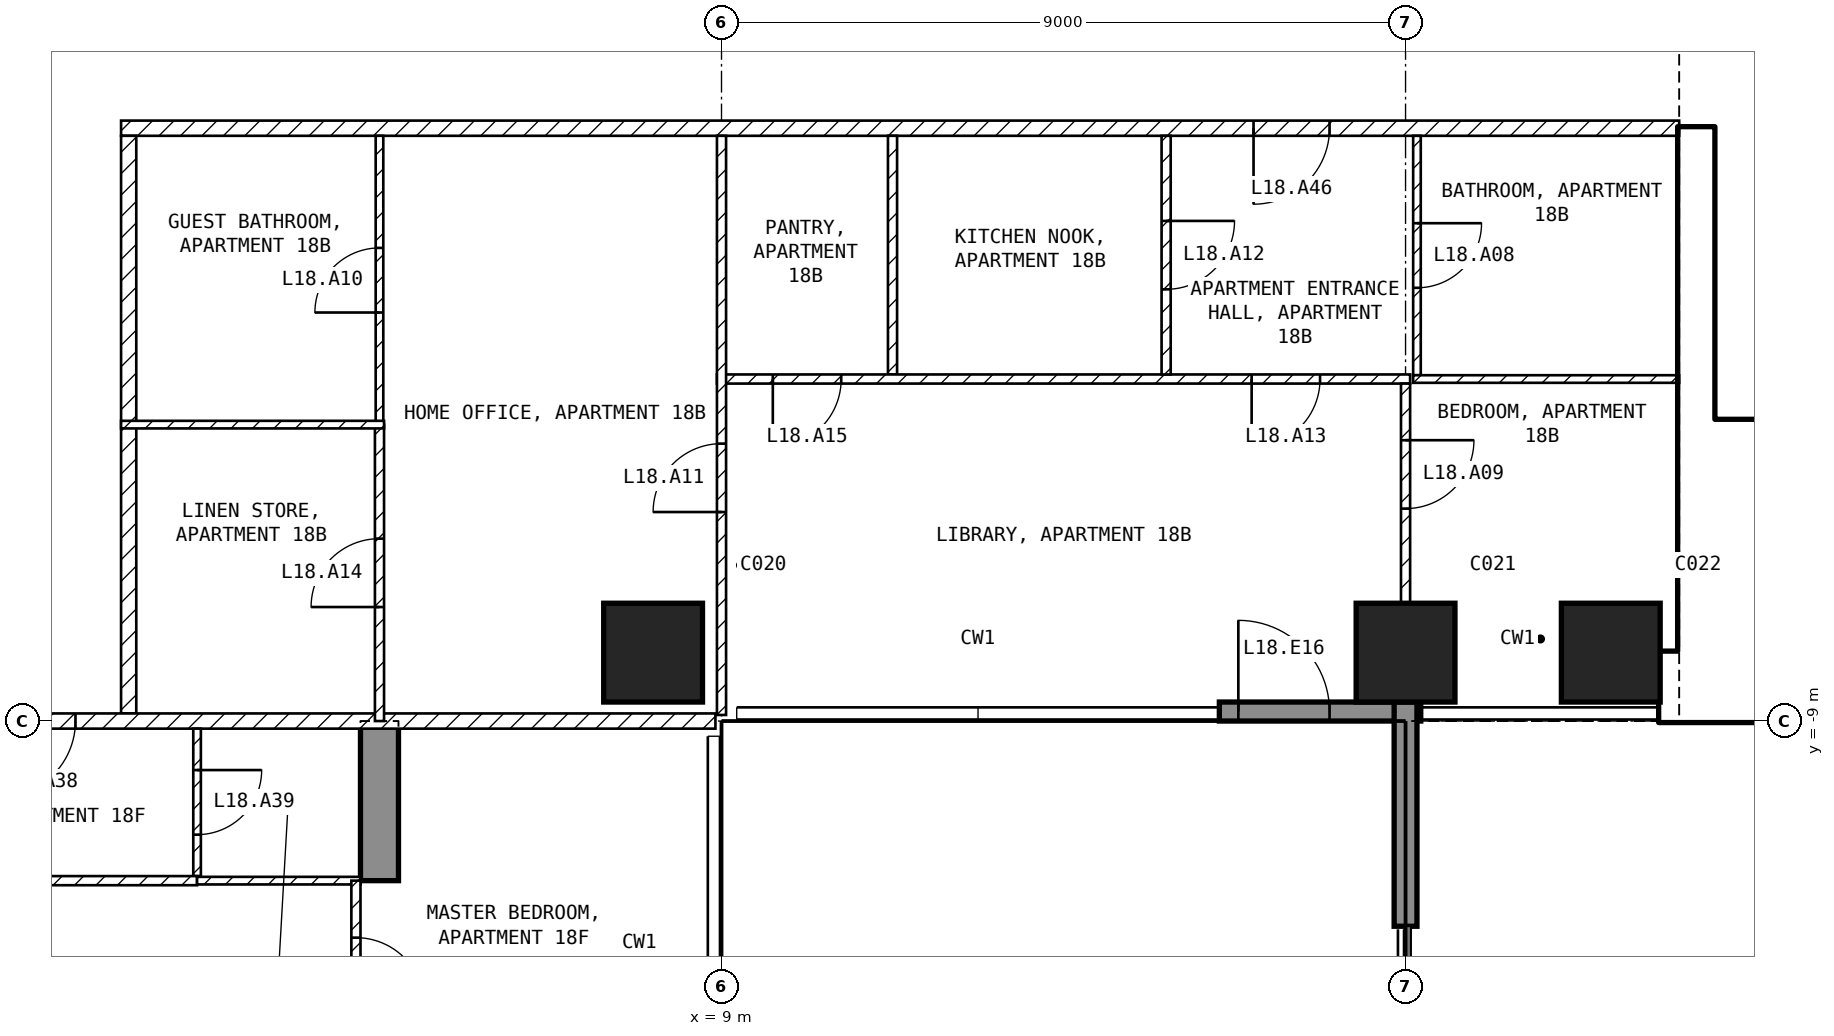
"""IFC4 building model, lengths in metres.
Left out: names, types, materials, properties, quantities, classifications, styles, units other than length and angle.
Written with IfcOpenShell. Run it as: python <this file> out.ifc"""

import sys

from ifc_helpers import new_model, si_unit, direction, frame, frame_2d, origin, origin_2d, place, context, subcontext, project, spatial, polyline, rectangle, outline, extrude, element, fill, save


model = new_model("IFC4")
c1 = context("Model", 3, precision=1e-05, world=origin(), true_north=direction((0.0, 1.0)))
c2 = subcontext(c1, "Body", "Model", "MODEL_VIEW")
j1 = project(units=[si_unit("LENGTHUNIT", "METRE"), si_unit("PLANEANGLEUNIT", "RADIAN")], contexts=[c1])
p1 = place(None, origin())
s1 = spatial("IfcSite", under=j1, at=p1, CompositionType="ELEMENT")
p2 = place(p1, origin())
s2 = spatial("IfcBuilding", under=s1, at=p2, CompositionType="ELEMENT")
p3 = place(p2, frame((0.0, 0.0, 82.0)))
s3 = spatial("IfcBuildingStorey", under=s2, at=p3, CompositionType="ELEMENT", Elevation=82.0)
for number, where, z_axis, x_axis in (
    (1, (8.1, -8.1, -0.25), (0.0, 0.0, 1.0), (1.0, 0.0, 0.0)),
    (2, (18.0, -8.1, -0.25), (0.0, 0.0, 1.0), (1.0, 0.0, 0.0)),
    (3, (20.7, -8.1, -0.25), (0.0, 0.0, 1.0), (1.0, 0.0, 0.0)),
):
    element("IfcColumn", number, at=place(p3, frame(where, z_axis=z_axis, x_axis=x_axis)), inside=s3, PredefinedType="COLUMN", context=c2, shape_type="SweptSolid", body=[
        extrude(rectangle(XDim=1.3, YDim=1.3, at=origin_2d()), origin(), (0.0, 0.0, 1.0), 3.5),
    ])
p4 = place(p3, frame((4.25, -25.45, -0.25), z_axis=(1.0, 0.0, 0.0), x_axis=(0.0, 1.0, 0.0)))
e4 = element("IfcWall", 4, at=p4, inside=s3, PredefinedType="SHEAR", context=c2, shape_type="SweptSolid", body=[
    extrude(outline(polyline([(0.0, 0.0), (4.15, 0.0), (4.15, 2.65), (6.55, 2.65), (6.55, 0.0), (11.95, 0.0), (11.95, 2.65), (14.35, 2.65), (14.35, 0.0), (16.45, 0.0), (16.45, 3.5), (0.0, 3.5), (0.0, 0.0)])), origin(), (0.0, 0.0, 1.0), 0.5),
])
p5 = place(p3, frame((15.55, -8.875, 0.0), z_axis=(0.0, 0.0, 1.0), x_axis=(1.0, 0.0, 0.0)))
e5 = element("IfcWall", 5, at=p5, inside=s3, PredefinedType="SOLIDWALL", context=c2, shape_type="SweptSolid", body=[
    extrude(rectangle(XDim=2.65, YDim=0.25, at=frame_2d((1.325, 0.0))), origin(), (0.0, 0.0, 1.0), 3.25),
])
p6 = place(p5, frame((0.25, 0.0, 0.0)))
e6 = element("IfcOpeningElement", 6, at=p6, cuts=e5, PredefinedType="OPENING", context=c2, shape_type="SweptSolid", body=[
    extrude(rectangle(XDim=1.2, YDim=2.4, at=frame_2d((0.6, 1.2))), frame((0.0, 0.135, 0.0), z_axis=(0.0, -1.0, 0.0), x_axis=(1.0, 0.0, 0.0)), (0.0, 0.0, 1.0), 0.27),
])
p7 = place(p3, frame((18.0, -8.75, 0.0), z_axis=(0.0, 0.0, 1.0), x_axis=(0.0, -1.0, 0.0)))
e7 = element("IfcWall", 7, at=p7, inside=s3, PredefinedType="SOLIDWALL", context=c2, shape_type="SweptSolid", body=[
    extrude(rectangle(XDim=2.95, YDim=0.3, at=frame_2d((1.475, 0.0))), origin(), (0.0, 0.0, 1.0), 3.25),
])
p8 = place(p3, frame((21.35, -8.55, 0.0), z_axis=(0.0, 0.0, 1.0), x_axis=(1.0, 0.0, 0.0)))
e8 = element("IfcWall", 8, at=p8, inside=s3, PredefinedType="SHEAR", context=c2, shape_type="SweptSolid", body=[
    extrude(rectangle(XDim=11.05, YDim=0.9, at=frame_2d((5.525, 0.0))), origin(), (0.0, 0.0, 1.0), 3.25),
])
p9 = place(p3, frame((21.825, -8.1, 0.0), z_axis=(0.0, 0.0, 1.0), x_axis=(0.0, 1.0, 0.0)))
e9 = element("IfcWall", 9, at=p9, inside=s3, PredefinedType="SHEAR", context=c2, shape_type="SweptSolid", body=[
    extrude(rectangle(XDim=6.9, YDim=0.45, at=frame_2d((3.45, 0.0))), origin(), (0.0, 0.0, 1.0), 3.25),
])
p10 = place(p3, frame((22.05, -5.15, 0.0), z_axis=(0.0, 0.0, 1.0), x_axis=(1.0, 0.0, 0.0)))
e10 = element("IfcWall", 10, at=p10, inside=s3, PredefinedType="SOLIDWALL", context=c2, shape_type="SweptSolid", body=[
    extrude(rectangle(XDim=6.3, YDim=0.2, at=frame_2d((3.15, 0.0))), origin(), (0.0, 0.0, 1.0), 3.25),
])
p11 = place(p10, frame((0.2, 0.0, 0.0)))
e11 = element("IfcOpeningElement", 11, at=p11, cuts=e10, PredefinedType="OPENING", context=c2, shape_type="SweptSolid", body=[
    extrude(rectangle(XDim=1.0, YDim=2.1, at=frame_2d((0.5, 1.05))), frame((0.0, 0.11, 0.0), z_axis=(0.0, -1.0, 0.0), x_axis=(1.0, 0.0, 0.0)), (0.0, 0.0, 1.0), 0.22),
])
p12 = place(p3, frame((21.6, -1.2, 0.0), z_axis=(0.0, 0.0, 1.0), x_axis=(-1.0, 0.0, 0.0)))
e12 = element("IfcWall", 12, at=p12, inside=s3, PredefinedType="PARTITIONING", context=c2, shape_type="SweptSolid", body=[
    extrude(rectangle(XDim=20.5, YDim=0.2, at=frame_2d((10.25, 0.0))), origin(), (0.0, 0.0, 1.0), 3.25),
])
p13 = place(p12, frame((4.6, 0.0, 0.0)))
e13 = element("IfcOpeningElement", 13, at=p13, cuts=e12, PredefinedType="OPENING", context=c2, shape_type="SweptSolid", body=[
    extrude(rectangle(XDim=1.0, YDim=2.1, at=frame_2d((0.5, 1.05))), frame((0.0, 0.11, 0.0), z_axis=(0.0, -1.0, 0.0), x_axis=(1.0, 0.0, 0.0)), (0.0, 0.0, 1.0), 0.22),
])
p14 = place(p3, frame((1.2, -1.3, 0.0), z_axis=(0.0, 0.0, 1.0), x_axis=(0.0, -1.0, 0.0)))
e14 = element("IfcWall", 14, at=p14, inside=s3, PredefinedType="PARTITIONING", context=c2, shape_type="SweptSolid", body=[
    extrude(rectangle(XDim=7.6, YDim=0.2, at=frame_2d((3.8, 0.0))), origin(), (0.0, 0.0, 1.0), 3.25),
])
p15 = place(p3, frame((8.92, -9.0, 0.0), z_axis=(0.0, 0.0, 1.0), x_axis=(-1.0, 0.0, 0.0)))
e15 = element("IfcWall", 15, at=p15, inside=s3, PredefinedType="PARTITIONING", context=c2, shape_type="SweptSolid", body=[
    extrude(rectangle(XDim=17.84, YDim=0.2, at=frame_2d((8.92, 0.0))), origin(), (0.0, 0.0, 1.0), 3.25),
])
p16 = place(p15, frame((8.42, 0.0, 0.0)))
e16 = element("IfcOpeningElement", 16, at=p16, cuts=e15, PredefinedType="OPENING", context=c2, shape_type="SweptSolid", body=[
    extrude(rectangle(XDim=1.0, YDim=2.1, at=frame_2d((0.5, 1.05))), frame((0.0, 0.11, 0.0), z_axis=(0.0, -1.0, 0.0), x_axis=(1.0, 0.0, 0.0)), (0.0, 0.0, 1.0), 0.22),
])
p17 = place(p3, frame((11.25, -1.3, 0.0), z_axis=(0.0, 0.0, 1.0), x_axis=(0.0, -1.0, 0.0)))
e17 = element("IfcWall", 17, at=p17, inside=s3, PredefinedType="PARTITIONING", context=c2, shape_type="SweptSolid", body=[
    extrude(rectangle(XDim=3.14, YDim=0.12, at=frame_2d((1.57, 0.0))), origin(), (0.0, 0.0, 1.0), 3.25),
])
p18 = place(p3, frame((18.06, -4.5, 0.0), z_axis=(0.0, 0.0, 1.0), x_axis=(-1.0, 0.0, 0.0)))
e18 = element("IfcWall", 18, at=p18, inside=s3, PredefinedType="PARTITIONING", context=c2, shape_type="SweptSolid", body=[
    extrude(rectangle(XDim=9.12, YDim=0.12, at=frame_2d((4.56, 0.0))), origin(), (0.0, 0.0, 1.0), 3.25),
])
p19 = place(p18, frame((1.185, 0.0, 0.0)))
e19 = element("IfcOpeningElement", 19, at=p19, cuts=e18, PredefinedType="OPENING", context=c2, shape_type="SweptSolid", body=[
    extrude(rectangle(XDim=0.9, YDim=2.1, at=frame_2d((0.45, 1.05))), frame((0.0, 0.07, 0.0), z_axis=(0.0, -1.0, 0.0), x_axis=(1.0, 0.0, 0.0)), (0.0, 0.0, 1.0), 0.14),
])
p20 = place(p18, frame((7.485, 0.0, 0.0)))
e20 = element("IfcOpeningElement", 20, at=p20, cuts=e18, PredefinedType="OPENING", context=c2, shape_type="SweptSolid", body=[
    extrude(rectangle(XDim=0.9, YDim=2.1, at=frame_2d((0.45, 1.05))), frame((0.0, 0.07, 0.0), z_axis=(0.0, -1.0, 0.0), x_axis=(1.0, 0.0, 0.0)), (0.0, 0.0, 1.0), 0.14),
])
p21 = place(p3, frame((9.0, -8.92, 0.0), z_axis=(0.0, 0.0, 1.0), x_axis=(0.0, 1.0, 0.0)))
e21 = element("IfcWall", 21, at=p21, inside=s3, PredefinedType="PARTITIONING", context=c2, shape_type="SweptSolid", body=[
    extrude(rectangle(XDim=7.62, YDim=0.12, at=frame_2d((3.81, 0.0))), origin(), (0.0, 0.0, 1.0), 3.25),
])
p22 = place(p21, frame((2.67, 0.0, 0.0)))
e22 = element("IfcOpeningElement", 22, at=p22, cuts=e21, PredefinedType="OPENING", context=c2, shape_type="SweptSolid", body=[
    extrude(rectangle(XDim=0.9, YDim=2.1, at=frame_2d((0.45, 1.05))), frame((0.0, 0.07, 0.0), z_axis=(0.0, -1.0, 0.0), x_axis=(1.0, 0.0, 0.0)), (0.0, 0.0, 1.0), 0.14),
])
p23 = place(p3, frame((14.85, -1.3, 0.0), z_axis=(0.0, 0.0, 1.0), x_axis=(0.0, -1.0, 0.0)))
e23 = element("IfcWall", 23, at=p23, inside=s3, PredefinedType="PARTITIONING", context=c2, shape_type="SweptSolid", body=[
    extrude(rectangle(XDim=3.14, YDim=0.12, at=frame_2d((1.57, 0.0))), origin(), (0.0, 0.0, 1.0), 3.25),
])
p24 = place(p23, frame((1.12, 0.0, 0.0)))
e24 = element("IfcOpeningElement", 24, at=p24, cuts=e23, PredefinedType="OPENING", context=c2, shape_type="SweptSolid", body=[
    extrude(rectangle(XDim=0.9, YDim=2.1, at=frame_2d((0.45, 1.05))), frame((0.0, 0.07, 0.0), z_axis=(0.0, -1.0, 0.0), x_axis=(1.0, 0.0, 0.0)), (0.0, 0.0, 1.0), 0.14),
])
p25 = place(p3, frame((18.15, -1.3, 0.0), z_axis=(0.0, 0.0, 1.0), x_axis=(0.0, -1.0, 0.0)))
e25 = element("IfcWall", 25, at=p25, inside=s3, PredefinedType="PARTITIONING", context=c2, shape_type="SweptSolid", body=[
    extrude(rectangle(XDim=3.15, YDim=0.1, at=frame_2d((1.575, 0.0))), origin(), (0.0, 0.0, 1.0), 2.346),
])
p26 = place(p25, frame((1.15, 0.0, 0.0)))
e26 = element("IfcOpeningElement", 26, at=p26, cuts=e25, PredefinedType="OPENING", context=c2, shape_type="SweptSolid", body=[
    extrude(rectangle(XDim=0.85, YDim=2.1, at=frame_2d((0.425, 1.05))), frame((0.0, 0.06, 0.0), z_axis=(0.0, -1.0, 0.0), x_axis=(1.0, 0.0, 0.0)), (0.0, 0.0, 1.0), 0.12),
])
p27 = place(p3, frame((21.6, -4.5, 0.0), z_axis=(0.0, 0.0, 1.0), x_axis=(-1.0, 0.0, 0.0)))
e27 = element("IfcWall", 27, at=p27, inside=s3, PredefinedType="PARTITIONING", context=c2, shape_type="SweptSolid", body=[
    extrude(rectangle(XDim=3.5, YDim=0.1, at=frame_2d((1.75, 0.0))), origin(), (0.0, 0.0, 1.0), 3.25),
])
p28 = place(p3, frame((18.0, -4.56, 0.0), z_axis=(0.0, 0.0, 1.0), x_axis=(0.0, -1.0, 0.0)))
e28 = element("IfcWall", 28, at=p28, inside=s3, PredefinedType="PARTITIONING", context=c2, shape_type="SweptSolid", body=[
    extrude(rectangle(XDim=2.89, YDim=0.12, at=frame_2d((1.445, 0.0))), origin(), (0.0, 0.0, 1.0), 2.346),
])
p29 = place(p28, frame((0.745, 0.0, 0.0)))
e29 = element("IfcOpeningElement", 29, at=p29, cuts=e28, PredefinedType="OPENING", context=c2, shape_type="SweptSolid", body=[
    extrude(rectangle(XDim=0.9, YDim=2.1, at=frame_2d((0.45, 1.05))), frame((0.0, 0.07, 0.0), z_axis=(0.0, -1.0, 0.0), x_axis=(1.0, 0.0, 0.0)), (0.0, 0.0, 1.0), 0.14),
])
p30 = place(p3, frame((4.5, -5.1, 0.0), z_axis=(0.0, 0.0, 1.0), x_axis=(0.0, 1.0, 0.0)))
e30 = element("IfcWall", 30, at=p30, inside=s3, PredefinedType="PARTITIONING", context=c2, shape_type="SweptSolid", body=[
    extrude(rectangle(XDim=3.8, YDim=0.1, at=frame_2d((1.9, 0.0))), origin(), (0.0, 0.0, 1.0), 3.25),
])
p31 = place(p30, frame((1.475, 0.0, 0.0)))
e31 = element("IfcOpeningElement", 31, at=p31, cuts=e30, PredefinedType="OPENING", context=c2, shape_type="SweptSolid", body=[
    extrude(rectangle(XDim=0.85, YDim=2.1, at=frame_2d((0.425, 1.05))), frame((0.0, 0.06, 0.0), z_axis=(0.0, -1.0, 0.0), x_axis=(1.0, 0.0, 0.0)), (0.0, 0.0, 1.0), 0.12),
])
p32 = place(p3, frame((4.5, -9.0, 0.0), z_axis=(0.0, 0.0, 1.0), x_axis=(0.0, 1.0, 0.0)))
e32 = element("IfcWall", 32, at=p32, inside=s3, PredefinedType="PARTITIONING", context=c2, shape_type="SweptSolid", body=[
    extrude(rectangle(XDim=3.9, YDim=0.12, at=frame_2d((1.95, 0.0))), origin(), (0.0, 0.0, 1.0), 3.25),
])
p33 = place(p32, frame((1.5, 0.0, 0.0)))
e33 = element("IfcOpeningElement", 33, at=p33, cuts=e32, PredefinedType="OPENING", context=c2, shape_type="SweptSolid", body=[
    extrude(rectangle(XDim=0.9, YDim=2.1, at=frame_2d((0.45, 1.05))), frame((0.0, 0.07, 0.0), z_axis=(0.0, -1.0, 0.0), x_axis=(1.0, 0.0, 0.0)), (0.0, 0.0, 1.0), 0.14),
])
p34 = place(p3, frame((4.56, -5.1, 0.0), z_axis=(0.0, 0.0, 1.0), x_axis=(-1.0, 0.0, 0.0)))
e34 = element("IfcWall", 34, at=p34, inside=s3, PredefinedType="PARTITIONING", context=c2, shape_type="SweptSolid", body=[
    extrude(rectangle(XDim=3.46, YDim=0.1, at=frame_2d((1.73, 0.0))), origin(), (0.0, 0.0, 1.0), 3.25),
])
p35 = place(p3, frame((2.1, -9.1, 0.0), z_axis=(0.0, 0.0, 1.0), x_axis=(0.0, -1.0, 0.0)))
e35 = element("IfcWall", 35, at=p35, inside=s3, PredefinedType="PARTITIONING", context=c2, shape_type="SweptSolid", body=[
    extrude(rectangle(XDim=1.94, YDim=0.1, at=frame_2d((0.97, 0.0))), origin(), (0.0, 0.0, 1.0), 3.25),
])
p36 = place(p35, frame((0.545, 0.0, 0.0)))
e36 = element("IfcOpeningElement", 36, at=p36, cuts=e35, PredefinedType="OPENING", context=c2, shape_type="SweptSolid", body=[
    extrude(rectangle(XDim=0.85, YDim=2.1, at=frame_2d((0.425, 1.05))), frame((0.0, 0.06, 0.0), z_axis=(0.0, -1.0, 0.0), x_axis=(1.0, 0.0, 0.0)), (0.0, 0.0, 1.0), 0.12),
])
p37 = place(p3, frame((2.1, -11.1, 0.0), z_axis=(0.0, 0.0, 1.0), x_axis=(-1.0, 0.0, 0.0)))
e37 = element("IfcWall", 37, at=p37, inside=s3, PredefinedType="PARTITIONING", context=c2, shape_type="SweptSolid", body=[
    extrude(rectangle(XDim=6.35, YDim=0.12, at=frame_2d((3.175, 0.0))), origin(), (0.0, 0.0, 1.0), 3.25),
])
p38 = place(p37, frame((2.725, 0.0, 0.0)))
e38 = element("IfcOpeningElement", 38, at=p38, cuts=e37, PredefinedType="OPENING", context=c2, shape_type="SweptSolid", body=[
    extrude(rectangle(XDim=0.9, YDim=2.1, at=frame_2d((0.45, 1.05))), frame((0.0, 0.07, 0.0), z_axis=(0.0, -1.0, 0.0), x_axis=(1.0, 0.0, 0.0)), (0.0, 0.0, 1.0), 0.14),
])
p39 = place(p3, frame((4.25, -11.1, 0.0), z_axis=(0.0, 0.0, 1.0), x_axis=(-1.0, 0.0, 0.0)))
e39 = element("IfcWall", 39, at=p39, inside=s3, PredefinedType="PARTITIONING", context=c2, shape_type="SweptSolid", body=[
    extrude(rectangle(XDim=2.15, YDim=0.1, at=frame_2d((1.075, 0.0))), origin(), (0.0, 0.0, 1.0), 3.25),
])
p40 = place(p3, frame((4.19, -11.1, 0.0), z_axis=(0.0, 0.0, 1.0), x_axis=(0.0, -1.0, 0.0)))
e40 = element("IfcWall", 40, at=p40, inside=s3, PredefinedType="PARTITIONING", context=c2, shape_type="SweptSolid", body=[
    extrude(rectangle(XDim=2.4, YDim=0.12, at=frame_2d((1.2, 0.0))), origin(), (0.0, 0.0, 1.0), 2.4),
])
p41 = place(p40, frame((0.75, 0.0, 0.0)))
e41 = element("IfcOpeningElement", 41, at=p41, cuts=e40, PredefinedType="OPENING", context=c2, shape_type="SweptSolid", body=[
    extrude(rectangle(XDim=0.9, YDim=2.1, at=frame_2d((0.45, 1.05))), frame((0.0, 0.07, 0.0), z_axis=(0.0, -1.0, 0.0), x_axis=(1.0, 0.0, 0.0)), (0.0, 0.0, 1.0), 0.14),
])
p42 = place(p6, origin())
e42 = element("IfcDoor", 42, at=p42, inside=s3, OperationType="SINGLE_SWING_LEFT", PredefinedType="DOOR", context=c2, shape_type="SweptSolid", body=[
    extrude(rectangle(XDim=1.2, YDim=2.4, at=frame_2d((0.6, 1.2))), frame((0.0, 0.025, 0.0), z_axis=(0.0, -1.0, 0.0), x_axis=(1.0, 0.0, 0.0)), (0.0, 0.0, 1.0), 0.05),
])
fill(e6, e42)
p43 = place(p11, origin())
e43 = element("IfcDoor", 43, at=p43, inside=s3, OperationType="SINGLE_SWING_LEFT", PredefinedType="DOOR", context=c2, shape_type="SweptSolid", body=[
    extrude(rectangle(XDim=1.0, YDim=2.1, at=frame_2d((0.5, 1.05))), frame((0.0, 0.025, 0.0), z_axis=(0.0, -1.0, 0.0), x_axis=(1.0, 0.0, 0.0)), (0.0, 0.0, 1.0), 0.05),
])
fill(e11, e43)
p44 = place(p26, origin())
e44 = element("IfcDoor", 44, at=p44, inside=s3, OperationType="SINGLE_SWING_LEFT", PredefinedType="DOOR", context=c2, shape_type="SweptSolid", body=[
    extrude(rectangle(XDim=0.85, YDim=2.1, at=frame_2d((0.425, 1.05))), frame((0.0, 0.025, 0.0), z_axis=(0.0, -1.0, 0.0), x_axis=(1.0, 0.0, 0.0)), (0.0, 0.0, 1.0), 0.05),
])
fill(e26, e44)
p45 = place(p29, origin())
e45 = element("IfcDoor", 45, at=p45, inside=s3, OperationType="SINGLE_SWING_LEFT", PredefinedType="DOOR", context=c2, shape_type="SweptSolid", body=[
    extrude(rectangle(XDim=0.9, YDim=2.1, at=frame_2d((0.45, 1.05))), frame((0.0, 0.025, 0.0), z_axis=(0.0, -1.0, 0.0), x_axis=(1.0, 0.0, 0.0)), (0.0, 0.0, 1.0), 0.05),
])
fill(e29, e45)
p46 = place(p31, origin())
e46 = element("IfcDoor", 46, at=p46, inside=s3, OperationType="SINGLE_SWING_LEFT", PredefinedType="DOOR", context=c2, shape_type="SweptSolid", body=[
    extrude(rectangle(XDim=0.85, YDim=2.1, at=frame_2d((0.425, 1.05))), frame((0.0, 0.025, 0.0), z_axis=(0.0, -1.0, 0.0), x_axis=(1.0, 0.0, 0.0)), (0.0, 0.0, 1.0), 0.05),
])
fill(e31, e46)
p47 = place(p22, origin())
e47 = element("IfcDoor", 47, at=p47, inside=s3, OperationType="SINGLE_SWING_LEFT", PredefinedType="DOOR", context=c2, shape_type="SweptSolid", body=[
    extrude(rectangle(XDim=0.9, YDim=2.1, at=frame_2d((0.45, 1.05))), frame((0.0, 0.025, 0.0), z_axis=(0.0, -1.0, 0.0), x_axis=(1.0, 0.0, 0.0)), (0.0, 0.0, 1.0), 0.05),
])
fill(e22, e47)
p48 = place(p24, origin())
e48 = element("IfcDoor", 48, at=p48, inside=s3, OperationType="SINGLE_SWING_LEFT", PredefinedType="DOOR", context=c2, shape_type="SweptSolid", body=[
    extrude(rectangle(XDim=0.9, YDim=2.1, at=frame_2d((0.45, 1.05))), frame((0.0, 0.025, 0.0), z_axis=(0.0, -1.0, 0.0), x_axis=(1.0, 0.0, 0.0)), (0.0, 0.0, 1.0), 0.05),
])
fill(e24, e48)
p49 = place(p19, origin())
e49 = element("IfcDoor", 49, at=p49, inside=s3, OperationType="SINGLE_SWING_RIGHT", PredefinedType="DOOR", context=c2, shape_type="SweptSolid", body=[
    extrude(rectangle(XDim=0.9, YDim=2.1, at=frame_2d((0.45, 1.05))), frame((0.0, 0.025, 0.0), z_axis=(0.0, -1.0, 0.0), x_axis=(1.0, 0.0, 0.0)), (0.0, 0.0, 1.0), 0.05),
])
fill(e19, e49)
p50 = place(p33, origin())
e50 = element("IfcDoor", 50, at=p50, inside=s3, OperationType="SINGLE_SWING_LEFT", PredefinedType="DOOR", context=c2, shape_type="SweptSolid", body=[
    extrude(rectangle(XDim=0.9, YDim=2.1, at=frame_2d((0.45, 1.05))), frame((0.0, 0.025, 0.0), z_axis=(0.0, -1.0, 0.0), x_axis=(1.0, 0.0, 0.0)), (0.0, 0.0, 1.0), 0.05),
])
fill(e33, e50)
p51 = place(p20, origin())
e51 = element("IfcDoor", 51, at=p51, inside=s3, OperationType="SINGLE_SWING_RIGHT", PredefinedType="DOOR", context=c2, shape_type="SweptSolid", body=[
    extrude(rectangle(XDim=0.9, YDim=2.1, at=frame_2d((0.45, 1.05))), frame((0.0, 0.025, 0.0), z_axis=(0.0, -1.0, 0.0), x_axis=(1.0, 0.0, 0.0)), (0.0, 0.0, 1.0), 0.05),
])
fill(e20, e51)
p52 = place(p16, origin())
e52 = element("IfcDoor", 52, at=p52, inside=s3, OperationType="SINGLE_SWING_RIGHT", PredefinedType="DOOR", context=c2, shape_type="SweptSolid", body=[
    extrude(rectangle(XDim=1.0, YDim=2.1, at=frame_2d((0.5, 1.05))), frame((0.0, 0.025, 0.0), z_axis=(0.0, -1.0, 0.0), x_axis=(1.0, 0.0, 0.0)), (0.0, 0.0, 1.0), 0.05),
])
fill(e16, e52)
p53 = place(p36, origin())
e53 = element("IfcDoor", 53, at=p53, inside=s3, OperationType="SINGLE_SWING_LEFT", PredefinedType="DOOR", context=c2, shape_type="SweptSolid", body=[
    extrude(rectangle(XDim=0.85, YDim=2.1, at=frame_2d((0.425, 1.05))), frame((0.0, 0.025, 0.0), z_axis=(0.0, -1.0, 0.0), x_axis=(1.0, 0.0, 0.0)), (0.0, 0.0, 1.0), 0.05),
])
fill(e36, e53)
p54 = place(p13, origin())
e54 = element("IfcDoor", 54, at=p54, inside=s3, OperationType="SINGLE_SWING_RIGHT", PredefinedType="DOOR", context=c2, shape_type="SweptSolid", body=[
    extrude(rectangle(XDim=1.0, YDim=2.1, at=frame_2d((0.5, 1.05))), frame((0.0, 0.025, 0.0), z_axis=(0.0, -1.0, 0.0), x_axis=(1.0, 0.0, 0.0)), (0.0, 0.0, 1.0), 0.05),
])
fill(e13, e54)
p55 = place(p41, origin())
e55 = element("IfcDoor", 55, at=p55, inside=s3, OperationType="SINGLE_SWING_RIGHT", PredefinedType="DOOR", context=c2, shape_type="SweptSolid", body=[
    extrude(rectangle(XDim=0.9, YDim=2.1, at=frame_2d((0.45, 1.05))), frame((0.0, 0.025, 0.0), z_axis=(0.0, -1.0, 0.0), x_axis=(1.0, 0.0, 0.0)), (0.0, 0.0, 1.0), 0.05),
])
fill(e41, e55)
save(model, sys.argv[1])
